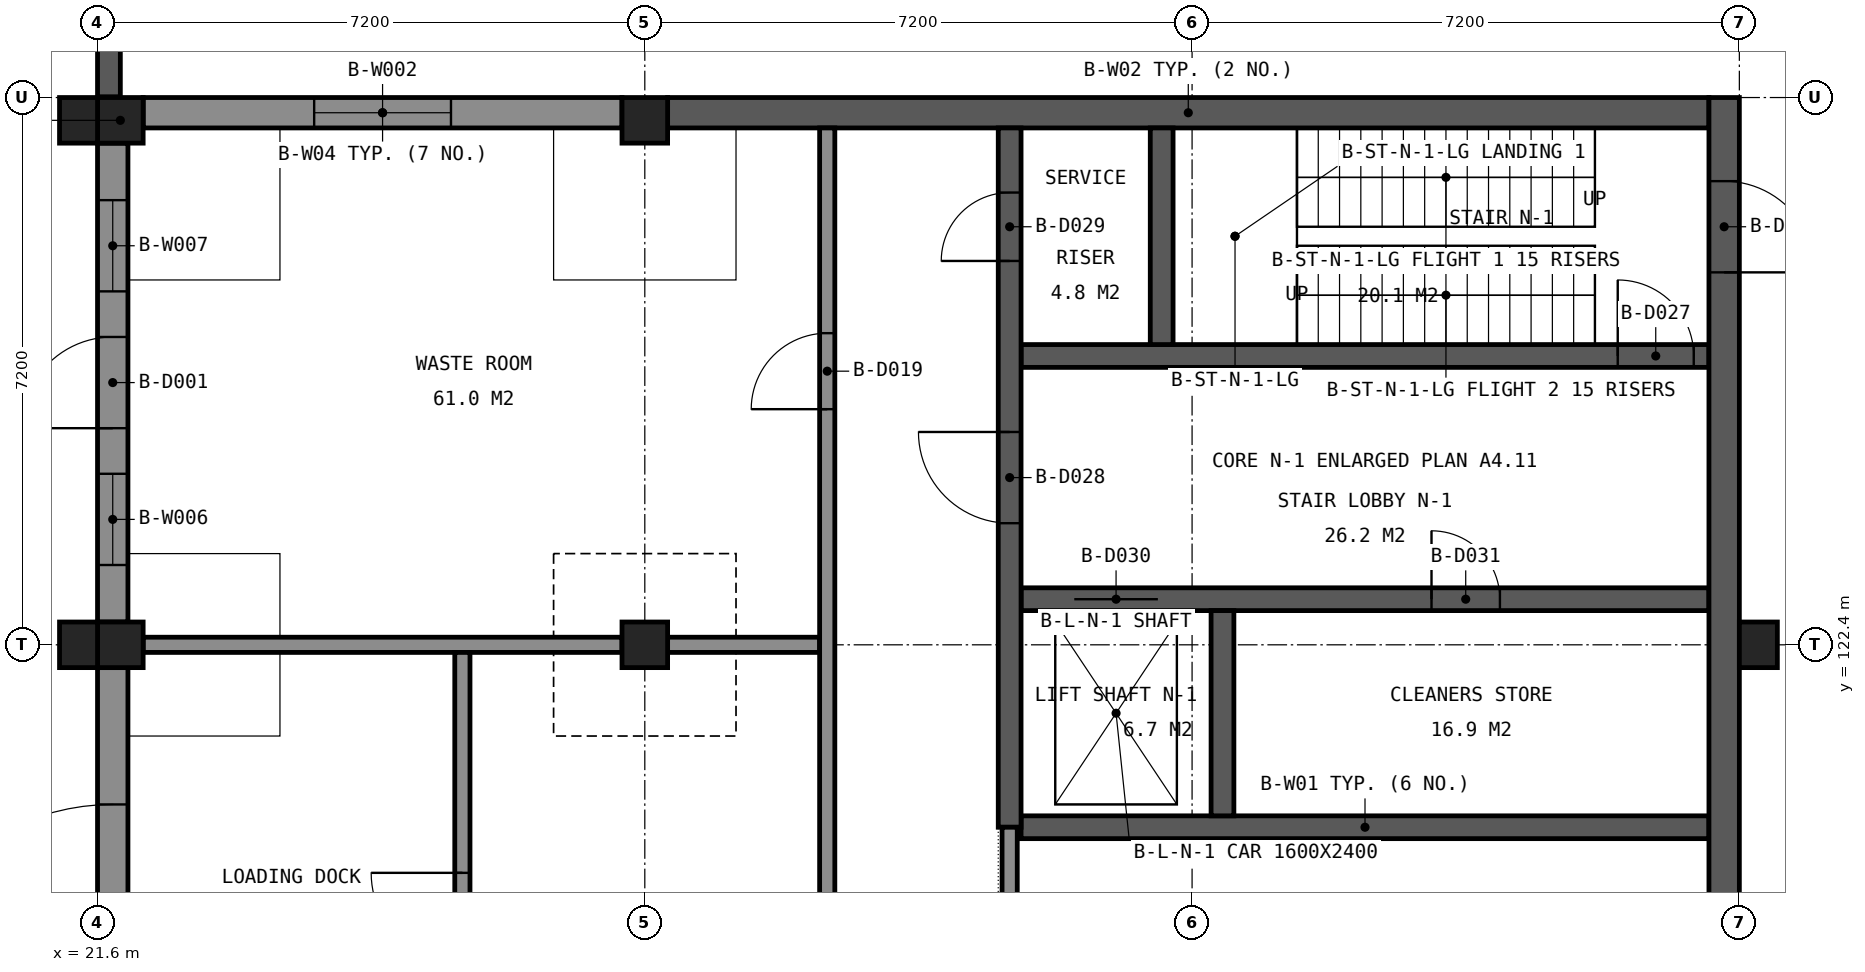
"""IFC4 building model, lengths in metres.
Left out: names, types, materials, properties, quantities, classifications, styles, units other than length and angle.
Written with IfcOpenShell. Run it as: python <this file> out.ifc"""

import sys

from ifc_helpers import new_model, si_unit, direction, frame, frame_2d, origin, origin_2d, place, context, subcontext, project, spatial, rectangle, extrude, element, fill, save


model = new_model("IFC4")
c1 = context("Model", 3, precision=1e-05, world=origin(), true_north=direction((0.0, 1.0)))
c2 = subcontext(c1, "Body", "Model", "MODEL_VIEW")
j1 = project(units=[si_unit("LENGTHUNIT", "METRE"), si_unit("PLANEANGLEUNIT", "RADIAN")], contexts=[c1])
p1 = place(None, origin())
s1 = spatial("IfcSite", under=j1, at=p1, CompositionType="ELEMENT")
p2 = place(p1, origin())
s2 = spatial("IfcBuilding", under=s1, at=p2, CompositionType="ELEMENT")
p3 = place(p2, origin())
s3 = spatial("IfcBuildingStorey", under=s2, at=p3, CompositionType="ELEMENT", Elevation=0.0)
for number, where, z_axis, x_axis in (
    (1, (21.9, 129.3, 0.0), (0.0, 0.0, 1.0), (1.0, 0.0, 0.0)),
    (2, (21.9, 122.4, 0.0), (0.0, 0.0, 1.0), (1.0, 0.0, 0.0)),
    (3, (28.8, 129.3, 0.0), (0.0, 0.0, 1.0), (1.0, 0.0, 0.0)),
    (4, (28.8, 122.4, 0.0), (0.0, 0.0, 1.0), (1.0, 0.0, 0.0)),
):
    element("IfcColumn", number, at=place(p3, frame(where, z_axis=z_axis, x_axis=x_axis)), inside=s3, PredefinedType="COLUMN", context=c2, shape_type="SweptSolid", body=[
        extrude(rectangle(XDim=0.6, YDim=0.6, at=origin_2d()), origin(), (0.0, 0.0, 1.0), 4.8),
    ])
p4 = place(p3, frame((33.75, 120.0, 0.0), z_axis=(0.0, 0.0, 1.0), x_axis=(1.0, 0.0, 0.0)))
e5 = element("IfcWall", 5, at=p4, inside=s3, PredefinedType="SHEAR", context=c2, shape_type="SweptSolid", body=[
    extrude(rectangle(XDim=9.05, YDim=0.3, at=frame_2d((4.525, 0.0))), origin(), (0.0, 0.0, 1.0), 4.55),
])
p5 = place(p3, frame((33.75, 123.0, 0.0), z_axis=(0.0, 0.0, 1.0), x_axis=(1.0, 0.0, 0.0)))
e6 = element("IfcWall", 6, at=p5, inside=s3, PredefinedType="SHEAR", context=c2, shape_type="SweptSolid", body=[
    extrude(rectangle(XDim=9.05, YDim=0.3, at=frame_2d((4.525, 0.0))), origin(), (0.0, 0.0, 1.0), 4.55),
])
p6 = place(p5, frame((0.7, 0.0, 0.0)))
e7 = element("IfcOpeningElement", 7, at=p6, cuts=e6, PredefinedType="OPENING", context=c2, shape_type="SweptSolid", body=[
    extrude(rectangle(XDim=1.1, YDim=2.1, at=frame_2d((0.55, 1.05))), frame((0.0, 0.16, 0.0), z_axis=(0.0, -1.0, 0.0), x_axis=(1.0, 0.0, 0.0)), (0.0, 0.0, 1.0), 0.32),
])
p7 = place(p5, frame((5.4, 0.0, 0.0)))
e8 = element("IfcOpeningElement", 8, at=p7, cuts=e6, PredefinedType="OPENING", context=c2, shape_type="SweptSolid", body=[
    extrude(rectangle(XDim=0.9, YDim=2.1, at=frame_2d((0.45, 1.05))), frame((0.0, 0.16, 0.0), z_axis=(0.0, -1.0, 0.0), x_axis=(1.0, 0.0, 0.0)), (0.0, 0.0, 1.0), 0.32),
])
p8 = place(p3, frame((33.75, 126.2, 0.0), z_axis=(0.0, 0.0, 1.0), x_axis=(1.0, 0.0, 0.0)))
e9 = element("IfcWall", 9, at=p8, inside=s3, PredefinedType="SHEAR", context=c2, shape_type="SweptSolid", body=[
    extrude(rectangle(XDim=9.05, YDim=0.3, at=frame_2d((4.525, 0.0))), origin(), (0.0, 0.0, 1.0), 4.55),
])
p9 = place(p8, frame((7.85, 0.0, 0.0)))
e10 = element("IfcOpeningElement", 10, at=p9, cuts=e9, PredefinedType="OPENING", context=c2, shape_type="SweptSolid", body=[
    extrude(rectangle(XDim=1.0, YDim=2.1, at=frame_2d((0.5, 1.05))), frame((0.0, 0.16, 0.0), z_axis=(0.0, -1.0, 0.0), x_axis=(1.0, 0.0, 0.0)), (0.0, 0.0, 1.0), 0.32),
])
p10 = place(p3, frame((29.1, 129.4, 0.0), z_axis=(0.0, 0.0, 1.0), x_axis=(1.0, 0.0, 0.0)))
e11 = element("IfcWall", 11, at=p10, inside=s3, PredefinedType="SHEAR", context=c2, shape_type="SweptSolid", body=[
    extrude(rectangle(XDim=13.7, YDim=0.4, at=frame_2d((6.85, 0.0))), origin(), (0.0, 0.0, 1.0), 4.55),
])
p11 = place(p3, frame((33.6, 120.0, 0.0), z_axis=(0.0, 0.0, 1.0), x_axis=(0.0, 1.0, 0.0)))
e12 = element("IfcWall", 12, at=p11, inside=s3, PredefinedType="SHEAR", context=c2, shape_type="SweptSolid", body=[
    extrude(rectangle(XDim=9.2, YDim=0.3, at=frame_2d((4.6, 0.0))), origin(), (0.0, 0.0, 1.0), 4.55),
])
p12 = place(p11, frame((4.0, 0.0, 0.0)))
e13 = element("IfcOpeningElement", 13, at=p12, cuts=e12, PredefinedType="OPENING", context=c2, shape_type="SweptSolid", body=[
    extrude(rectangle(XDim=1.2, YDim=2.1, at=frame_2d((0.6, 1.05))), frame((0.0, 0.16, 0.0), z_axis=(0.0, -1.0, 0.0), x_axis=(1.0, 0.0, 0.0)), (0.0, 0.0, 1.0), 0.32),
])
p13 = place(p11, frame((7.45, 0.0, 0.0)))
e14 = element("IfcOpeningElement", 14, at=p13, cuts=e12, PredefinedType="OPENING", context=c2, shape_type="SweptSolid", body=[
    extrude(rectangle(XDim=0.9, YDim=2.1, at=frame_2d((0.45, 1.05))), frame((0.0, 0.16, 0.0), z_axis=(0.0, -1.0, 0.0), x_axis=(1.0, 0.0, 0.0)), (0.0, 0.0, 1.0), 0.32),
])
p14 = place(p3, frame((35.6, 126.35, 0.0), z_axis=(0.0, 0.0, 1.0), x_axis=(0.0, 1.0, 0.0)))
e15 = element("IfcWall", 15, at=p14, inside=s3, PredefinedType="SHEAR", context=c2, shape_type="SweptSolid", body=[
    extrude(rectangle(XDim=2.85, YDim=0.3, at=frame_2d((1.425, 0.0))), origin(), (0.0, 0.0, 1.0), 4.55),
])
p15 = place(p3, frame((36.4, 120.15, -1.2), z_axis=(0.0, 0.0, 1.0), x_axis=(0.0, 1.0, 0.0)))
e16 = element("IfcWall", 16, at=p15, inside=s3, PredefinedType="SHEAR", context=c2, shape_type="SweptSolid", body=[
    extrude(rectangle(XDim=2.7, YDim=0.3, at=frame_2d((1.35, 0.0))), origin(), (0.0, 0.0, 1.0), 5.75),
])
p16 = place(p3, frame((43.0, 115.5, 0.0), z_axis=(0.0, 0.0, 1.0), x_axis=(0.0, 1.0, 0.0)))
e17 = element("IfcWall", 17, at=p16, inside=s3, PredefinedType="SHEAR", context=c2, shape_type="SweptSolid", body=[
    extrude(rectangle(XDim=14.1, YDim=0.4, at=frame_2d((7.05, 0.0))), origin(), (0.0, 0.0, 1.0), 4.55),
])
p17 = place(p16, frame((13.0, 0.0, 0.0), z_axis=(0.0, 0.0, 1.0), x_axis=(-1.0, 0.0, 0.0)))
e18 = element("IfcOpeningElement", 18, at=p17, cuts=e17, PredefinedType="OPENING", context=c2, shape_type="SweptSolid", body=[
    extrude(rectangle(XDim=1.2, YDim=2.1, at=frame_2d((0.6, 1.05))), frame((0.0, 0.21, 0.0), z_axis=(0.0, -1.0, 0.0), x_axis=(1.0, 0.0, 0.0)), (0.0, 0.0, 1.0), 0.42),
])
p18 = place(p3, frame((21.75, 129.61, -0.25), z_axis=(0.0, 0.0, 1.0), x_axis=(0.0, 1.0, 0.0)))
e19 = element("IfcWall", 19, at=p18, inside=s3, PredefinedType="SOLIDWALL", context=c2, shape_type="SweptSolid", body=[
    extrude(rectangle(XDim=7.19, YDim=0.3, at=frame_2d((3.595, 0.0))), origin(), (0.0, 0.0, 1.0), 6.15),
])
p19 = place(p3, frame((22.2, 129.4, 0.0), z_axis=(0.0, 0.0, 1.0), x_axis=(1.0, 0.0, 0.0)))
e20 = element("IfcWall", 20, at=p19, inside=s3, PredefinedType="SOLIDWALL", context=c2, shape_type="SweptSolid", body=[
    extrude(rectangle(XDim=6.3, YDim=0.4, at=frame_2d((3.15, 0.0))), origin(), (0.0, 0.0, 1.0), 3.95),
])
p20 = place(p19, frame((2.25, 0.0, 2.0)))
e21 = element("IfcOpeningElement", 21, at=p20, cuts=e20, PredefinedType="OPENING", context=c2, shape_type="SweptSolid", body=[
    extrude(rectangle(XDim=1.8, YDim=1.5, at=frame_2d((0.9, 0.75))), frame((0.0, 0.21, 0.0), z_axis=(0.0, -1.0, 0.0), x_axis=(1.0, 0.0, 0.0)), (0.0, 0.0, 1.0), 0.42),
])
p21 = place(p3, frame((21.8, 115.5, 0.0), z_axis=(0.0, 0.0, 1.0), x_axis=(0.0, 1.0, 0.0)))
e22 = element("IfcWall", 22, at=p21, inside=s3, PredefinedType="SOLIDWALL", context=c2, shape_type="SweptSolid", body=[
    extrude(rectangle(XDim=6.6, YDim=0.4, at=frame_2d((3.3, 0.0))), origin(), (0.0, 0.0, 1.0), 3.95),
])
p22 = place(p21, frame((1.8, 0.0, 0.0)))
e23 = element("IfcOpeningElement", 23, at=p22, cuts=e22, PredefinedType="OPENING", context=c2, shape_type="SweptSolid", body=[
    extrude(rectangle(XDim=3.0, YDim=3.0, at=frame_2d((1.5, 1.5))), frame((0.0, 0.21, 0.0), z_axis=(0.0, -1.0, 0.0), x_axis=(1.0, 0.0, 0.0)), (0.0, 0.0, 1.0), 0.42),
])
p23 = place(p3, frame((21.8, 122.7, 0.0), z_axis=(0.0, 0.0, 1.0), x_axis=(0.0, 1.0, 0.0)))
e24 = element("IfcWall", 24, at=p23, inside=s3, PredefinedType="SOLIDWALL", context=c2, shape_type="SweptSolid", body=[
    extrude(rectangle(XDim=6.3, YDim=0.4, at=frame_2d((3.15, 0.0))), origin(), (0.0, 0.0, 1.0), 3.95),
])
p24 = place(p23, frame((2.55, 0.0, 0.0)))
e25 = element("IfcOpeningElement", 25, at=p24, cuts=e24, PredefinedType="OPENING", context=c2, shape_type="SweptSolid", body=[
    extrude(rectangle(XDim=1.2, YDim=2.1, at=frame_2d((0.6, 1.05))), frame((0.0, 0.21, 0.0), z_axis=(0.0, -1.0, 0.0), x_axis=(1.0, 0.0, 0.0)), (0.0, 0.0, 1.0), 0.42),
])
p25 = place(p23, frame((0.75, 0.0, 2.0)))
e26 = element("IfcOpeningElement", 26, at=p25, cuts=e24, PredefinedType="OPENING", context=c2, shape_type="SweptSolid", body=[
    extrude(rectangle(XDim=1.2, YDim=1.5, at=frame_2d((0.6, 0.75))), frame((0.0, 0.21, 0.0), z_axis=(0.0, -1.0, 0.0), x_axis=(1.0, 0.0, 0.0)), (0.0, 0.0, 1.0), 0.42),
])
p26 = place(p23, frame((4.35, 0.0, 2.0)))
e27 = element("IfcOpeningElement", 27, at=p26, cuts=e24, PredefinedType="OPENING", context=c2, shape_type="SweptSolid", body=[
    extrude(rectangle(XDim=1.2, YDim=1.5, at=frame_2d((0.6, 0.75))), frame((0.0, 0.21, 0.0), z_axis=(0.0, -1.0, 0.0), x_axis=(1.0, 0.0, 0.0)), (0.0, 0.0, 1.0), 0.42),
])
for number, where, z_axis, x_axis in (
    (28, (21.35, 122.4, -0.25), (0.0, 0.0, 1.0), (1.0, 0.0, 0.0)),
    (29, (21.35, 129.3, -0.25), (0.0, 0.0, 1.0), (1.0, 0.0, 0.0)),
    (30, (43.45, 122.4, -0.25), (0.0, 0.0, 1.0), (1.0, 0.0, 0.0)),
):
    element("IfcColumn", number, at=place(p3, frame(where, z_axis=z_axis, x_axis=x_axis)), inside=s3, PredefinedType="COLUMN", context=c2, shape_type="SweptSolid", body=[
        extrude(rectangle(XDim=0.5, YDim=0.6, at=origin_2d()), origin(), (0.0, 0.0, 1.0), 5.05),
    ])
p27 = place(p3, frame((22.2, 122.4, 0.0), z_axis=(0.0, 0.0, 1.0), x_axis=(1.0, 0.0, 0.0)))
e31 = element("IfcWall", 31, at=p27, inside=s3, PredefinedType="PARTITIONING", context=c2, shape_type="SweptSolid", body=[
    extrude(rectangle(XDim=6.3, YDim=0.2, at=frame_2d((3.15, 0.0))), origin(), (0.0, 0.0, 1.0), 3.95),
])
p28 = place(p3, frame((29.1, 122.4, 0.0), z_axis=(0.0, 0.0, 1.0), x_axis=(1.0, 0.0, 0.0)))
e32 = element("IfcWall", 32, at=p28, inside=s3, PredefinedType="PARTITIONING", context=c2, shape_type="SweptSolid", body=[
    extrude(rectangle(XDim=2.0, YDim=0.2, at=frame_2d((1.0, 0.0))), origin(), (0.0, 0.0, 1.0), 3.95),
])
p29 = place(p3, frame((26.4, 100.9, 0.0), z_axis=(0.0, 0.0, 1.0), x_axis=(0.0, 1.0, 0.0)))
e33 = element("IfcWall", 33, at=p29, inside=s3, PredefinedType="PARTITIONING", context=c2, shape_type="SweptSolid", body=[
    extrude(rectangle(XDim=21.4, YDim=0.2, at=frame_2d((10.7, 0.0))), origin(), (0.0, 0.0, 1.0), 3.95),
])
p30 = place(p29, frame((17.3, 0.0, 0.0)))
e34 = element("IfcOpeningElement", 34, at=p30, cuts=e33, PredefinedType="OPENING", context=c2, shape_type="SweptSolid", body=[
    extrude(rectangle(XDim=1.2, YDim=2.1, at=frame_2d((0.6, 1.05))), frame((0.0, 0.11, 0.0), z_axis=(0.0, -1.0, 0.0), x_axis=(1.0, 0.0, 0.0)), (0.0, 0.0, 1.0), 0.22),
])
p31 = place(p29, frame((10.1, 0.0, 0.0)))
e35 = element("IfcOpeningElement", 35, at=p31, cuts=e33, PredefinedType="OPENING", context=c2, shape_type="SweptSolid", body=[
    extrude(rectangle(XDim=1.2, YDim=2.1, at=frame_2d((0.6, 1.05))), frame((0.0, 0.11, 0.0), z_axis=(0.0, -1.0, 0.0), x_axis=(1.0, 0.0, 0.0)), (0.0, 0.0, 1.0), 0.22),
])
p32 = place(p29, frame((2.9, 0.0, 0.0)))
e36 = element("IfcOpeningElement", 36, at=p32, cuts=e33, PredefinedType="OPENING", context=c2, shape_type="SweptSolid", body=[
    extrude(rectangle(XDim=1.2, YDim=2.1, at=frame_2d((0.6, 1.05))), frame((0.0, 0.11, 0.0), z_axis=(0.0, -1.0, 0.0), x_axis=(1.0, 0.0, 0.0)), (0.0, 0.0, 1.0), 0.22),
])
p33 = place(p3, frame((31.2, 86.8, 0.0), z_axis=(0.0, 0.0, 1.0), x_axis=(0.0, 1.0, 0.0)))
e37 = element("IfcWall", 37, at=p33, inside=s3, PredefinedType="PARTITIONING", context=c2, shape_type="SweptSolid", body=[
    extrude(rectangle(XDim=42.4, YDim=0.2, at=frame_2d((21.2, 0.0))), origin(), (0.0, 0.0, 1.0), 3.95),
])
p34 = place(p33, frame((38.7, 0.0, 0.0)))
e38 = element("IfcOpeningElement", 38, at=p34, cuts=e37, PredefinedType="OPENING", context=c2, shape_type="SweptSolid", body=[
    extrude(rectangle(XDim=1.0, YDim=2.1, at=frame_2d((0.5, 1.05))), frame((0.0, 0.11, 0.0), z_axis=(0.0, -1.0, 0.0), x_axis=(1.0, 0.0, 0.0)), (0.0, 0.0, 1.0), 0.22),
])
p35 = place(p33, frame((23.9, 0.0, 0.0)))
e39 = element("IfcOpeningElement", 39, at=p35, cuts=e37, PredefinedType="OPENING", context=c2, shape_type="SweptSolid", body=[
    extrude(rectangle(XDim=1.8, YDim=2.1, at=frame_2d((0.9, 1.05))), frame((0.0, 0.11, 0.0), z_axis=(0.0, -1.0, 0.0), x_axis=(1.0, 0.0, 0.0)), (0.0, 0.0, 1.0), 0.22),
])
p36 = place(p33, frame((6.2, 0.0, 0.0)))
e40 = element("IfcOpeningElement", 40, at=p36, cuts=e37, PredefinedType="OPENING", context=c2, shape_type="SweptSolid", body=[
    extrude(rectangle(XDim=1.2, YDim=2.1, at=frame_2d((0.6, 1.05))), frame((0.0, 0.11, 0.0), z_axis=(0.0, -1.0, 0.0), x_axis=(1.0, 0.0, 0.0)), (0.0, 0.0, 1.0), 0.22),
])
p37 = place(p3, frame((33.6, 96.0, 0.0), z_axis=(0.0, 0.0, 1.0), x_axis=(0.0, 1.0, 0.0)))
e41 = element("IfcWall", 41, at=p37, inside=s3, PredefinedType="PARTITIONING", context=c2, shape_type="SweptSolid", body=[
    extrude(rectangle(XDim=24.0, YDim=0.2, at=frame_2d((12.0, 0.0))), origin(), (0.0, 0.0, 1.0), 3.95),
])
p38 = place(p37, frame((17.1, 0.0, 0.0)))
e42 = element("IfcOpeningElement", 42, at=p38, cuts=e41, PredefinedType="OPENING", context=c2, shape_type="SweptSolid", body=[
    extrude(rectangle(XDim=1.8, YDim=2.1, at=frame_2d((0.9, 1.05))), frame((0.0, 0.11, 0.0), z_axis=(0.0, -1.0, 0.0), x_axis=(1.0, 0.0, 0.0)), (0.0, 0.0, 1.0), 0.22),
])
p39 = place(p37, frame((5.1, 0.0, 0.0)))
e43 = element("IfcOpeningElement", 43, at=p39, cuts=e41, PredefinedType="OPENING", context=c2, shape_type="SweptSolid", body=[
    extrude(rectangle(XDim=1.8, YDim=2.1, at=frame_2d((0.9, 1.05))), frame((0.0, 0.11, 0.0), z_axis=(0.0, -1.0, 0.0), x_axis=(1.0, 0.0, 0.0)), (0.0, 0.0, 1.0), 0.22),
])
p40 = place(p24, origin())
e44 = element("IfcDoor", 44, at=p40, inside=s3, OperationType="SINGLE_SWING_LEFT", PredefinedType="DOOR", context=c2, shape_type="SweptSolid", body=[
    extrude(rectangle(XDim=1.2, YDim=2.1, at=frame_2d((0.6, 1.05))), frame((0.0, 0.025, 0.0), z_axis=(0.0, -1.0, 0.0), x_axis=(1.0, 0.0, 0.0)), (0.0, 0.0, 1.0), 0.05),
])
fill(e25, e44)
p41 = place(p22, origin())
e45 = element("IfcDoor", 45, at=p41, inside=s3, OperationType="ROLLINGUP", PredefinedType="DOOR", context=c2, shape_type="SweptSolid", body=[
    extrude(rectangle(XDim=3.0, YDim=3.0, at=frame_2d((1.5, 1.5))), frame((0.0, 0.025, 0.0), z_axis=(0.0, -1.0, 0.0), x_axis=(1.0, 0.0, 0.0)), (0.0, 0.0, 1.0), 0.05),
])
fill(e23, e45)
p42 = place(p17, origin())
e46 = element("IfcDoor", 46, at=p42, inside=s3, OperationType="SINGLE_SWING_RIGHT", PredefinedType="DOOR", context=c2, shape_type="SweptSolid", body=[
    extrude(rectangle(XDim=1.2, YDim=2.1, at=frame_2d((0.6, 1.05))), frame((0.0, 0.025, 0.0), z_axis=(0.0, -1.0, 0.0), x_axis=(1.0, 0.0, 0.0)), (0.0, 0.0, 1.0), 0.05),
])
fill(e18, e46)
p43 = place(p20, origin())
e47 = element("IfcWindow", 47, at=p43, inside=s3, PartitioningType="SINGLE_PANEL", PredefinedType="WINDOW", context=c2, shape_type="SweptSolid", body=[
    extrude(rectangle(XDim=1.8, YDim=1.5, at=frame_2d((0.9, 0.75))), frame((0.0, 0.03, 0.0), z_axis=(0.0, -1.0, 0.0), x_axis=(1.0, 0.0, 0.0)), (0.0, 0.0, 1.0), 0.06),
])
fill(e21, e47)
p44 = place(p25, origin())
e48 = element("IfcWindow", 48, at=p44, inside=s3, PartitioningType="SINGLE_PANEL", PredefinedType="WINDOW", context=c2, shape_type="SweptSolid", body=[
    extrude(rectangle(XDim=1.2, YDim=1.5, at=frame_2d((0.6, 0.75))), frame((0.0, 0.03, 0.0), z_axis=(0.0, -1.0, 0.0), x_axis=(1.0, 0.0, 0.0)), (0.0, 0.0, 1.0), 0.06),
])
fill(e26, e48)
p45 = place(p26, origin())
e49 = element("IfcWindow", 49, at=p45, inside=s3, PartitioningType="SINGLE_PANEL", PredefinedType="WINDOW", context=c2, shape_type="SweptSolid", body=[
    extrude(rectangle(XDim=1.2, YDim=1.5, at=frame_2d((0.6, 0.75))), frame((0.0, 0.03, 0.0), z_axis=(0.0, -1.0, 0.0), x_axis=(1.0, 0.0, 0.0)), (0.0, 0.0, 1.0), 0.06),
])
fill(e27, e49)
p46 = place(p34, origin())
e50 = element("IfcDoor", 50, at=p46, inside=s3, OperationType="SINGLE_SWING_LEFT", PredefinedType="DOOR", context=c2, shape_type="SweptSolid", body=[
    extrude(rectangle(XDim=1.0, YDim=2.1, at=frame_2d((0.5, 1.05))), frame((0.0, 0.025, 0.0), z_axis=(0.0, -1.0, 0.0), x_axis=(1.0, 0.0, 0.0)), (0.0, 0.0, 1.0), 0.05),
])
fill(e38, e50)
p47 = place(p30, origin())
e51 = element("IfcDoor", 51, at=p47, inside=s3, OperationType="SINGLE_SWING_RIGHT", PredefinedType="DOOR", context=c2, shape_type="SweptSolid", body=[
    extrude(rectangle(XDim=1.2, YDim=2.1, at=frame_2d((0.6, 1.05))), frame((0.0, 0.025, 0.0), z_axis=(0.0, -1.0, 0.0), x_axis=(1.0, 0.0, 0.0)), (0.0, 0.0, 1.0), 0.05),
])
fill(e34, e51)
p48 = place(p9, origin())
e52 = element("IfcDoor", 52, at=p48, inside=s3, OperationType="SINGLE_SWING_LEFT", PredefinedType="DOOR", context=c2, shape_type="SweptSolid", body=[
    extrude(rectangle(XDim=1.0, YDim=2.1, at=frame_2d((0.5, 1.05))), frame((0.0, 0.025, 0.0), z_axis=(0.0, -1.0, 0.0), x_axis=(1.0, 0.0, 0.0)), (0.0, 0.0, 1.0), 0.05),
])
fill(e10, e52)
p49 = place(p12, origin())
e53 = element("IfcDoor", 53, at=p49, inside=s3, OperationType="SINGLE_SWING_RIGHT", PredefinedType="DOOR", context=c2, shape_type="SweptSolid", body=[
    extrude(rectangle(XDim=1.2, YDim=2.1, at=frame_2d((0.6, 1.05))), frame((0.0, 0.025, 0.0), z_axis=(0.0, -1.0, 0.0), x_axis=(1.0, 0.0, 0.0)), (0.0, 0.0, 1.0), 0.05),
])
fill(e13, e53)
p50 = place(p13, origin())
e54 = element("IfcDoor", 54, at=p50, inside=s3, OperationType="SINGLE_SWING_LEFT", PredefinedType="DOOR", context=c2, shape_type="SweptSolid", body=[
    extrude(rectangle(XDim=0.9, YDim=2.1, at=frame_2d((0.45, 1.05))), frame((0.0, 0.025, 0.0), z_axis=(0.0, -1.0, 0.0), x_axis=(1.0, 0.0, 0.0)), (0.0, 0.0, 1.0), 0.05),
])
fill(e14, e54)
p51 = place(p6, origin())
e55 = element("IfcDoor", 55, at=p51, inside=s3, OperationType="SLIDING_TO_LEFT", PredefinedType="DOOR", context=c2, shape_type="SweptSolid", body=[
    extrude(rectangle(XDim=1.1, YDim=2.1, at=frame_2d((0.55, 1.05))), frame((0.0, 0.025, 0.0), z_axis=(0.0, -1.0, 0.0), x_axis=(1.0, 0.0, 0.0)), (0.0, 0.0, 1.0), 0.05),
])
fill(e7, e55)
p52 = place(p7, origin())
e56 = element("IfcDoor", 56, at=p52, inside=s3, OperationType="SINGLE_SWING_LEFT", PredefinedType="DOOR", context=c2, shape_type="SweptSolid", body=[
    extrude(rectangle(XDim=0.9, YDim=2.1, at=frame_2d((0.45, 1.05))), frame((0.0, 0.025, 0.0), z_axis=(0.0, -1.0, 0.0), x_axis=(1.0, 0.0, 0.0)), (0.0, 0.0, 1.0), 0.05),
])
fill(e8, e56)
save(model, sys.argv[1])
